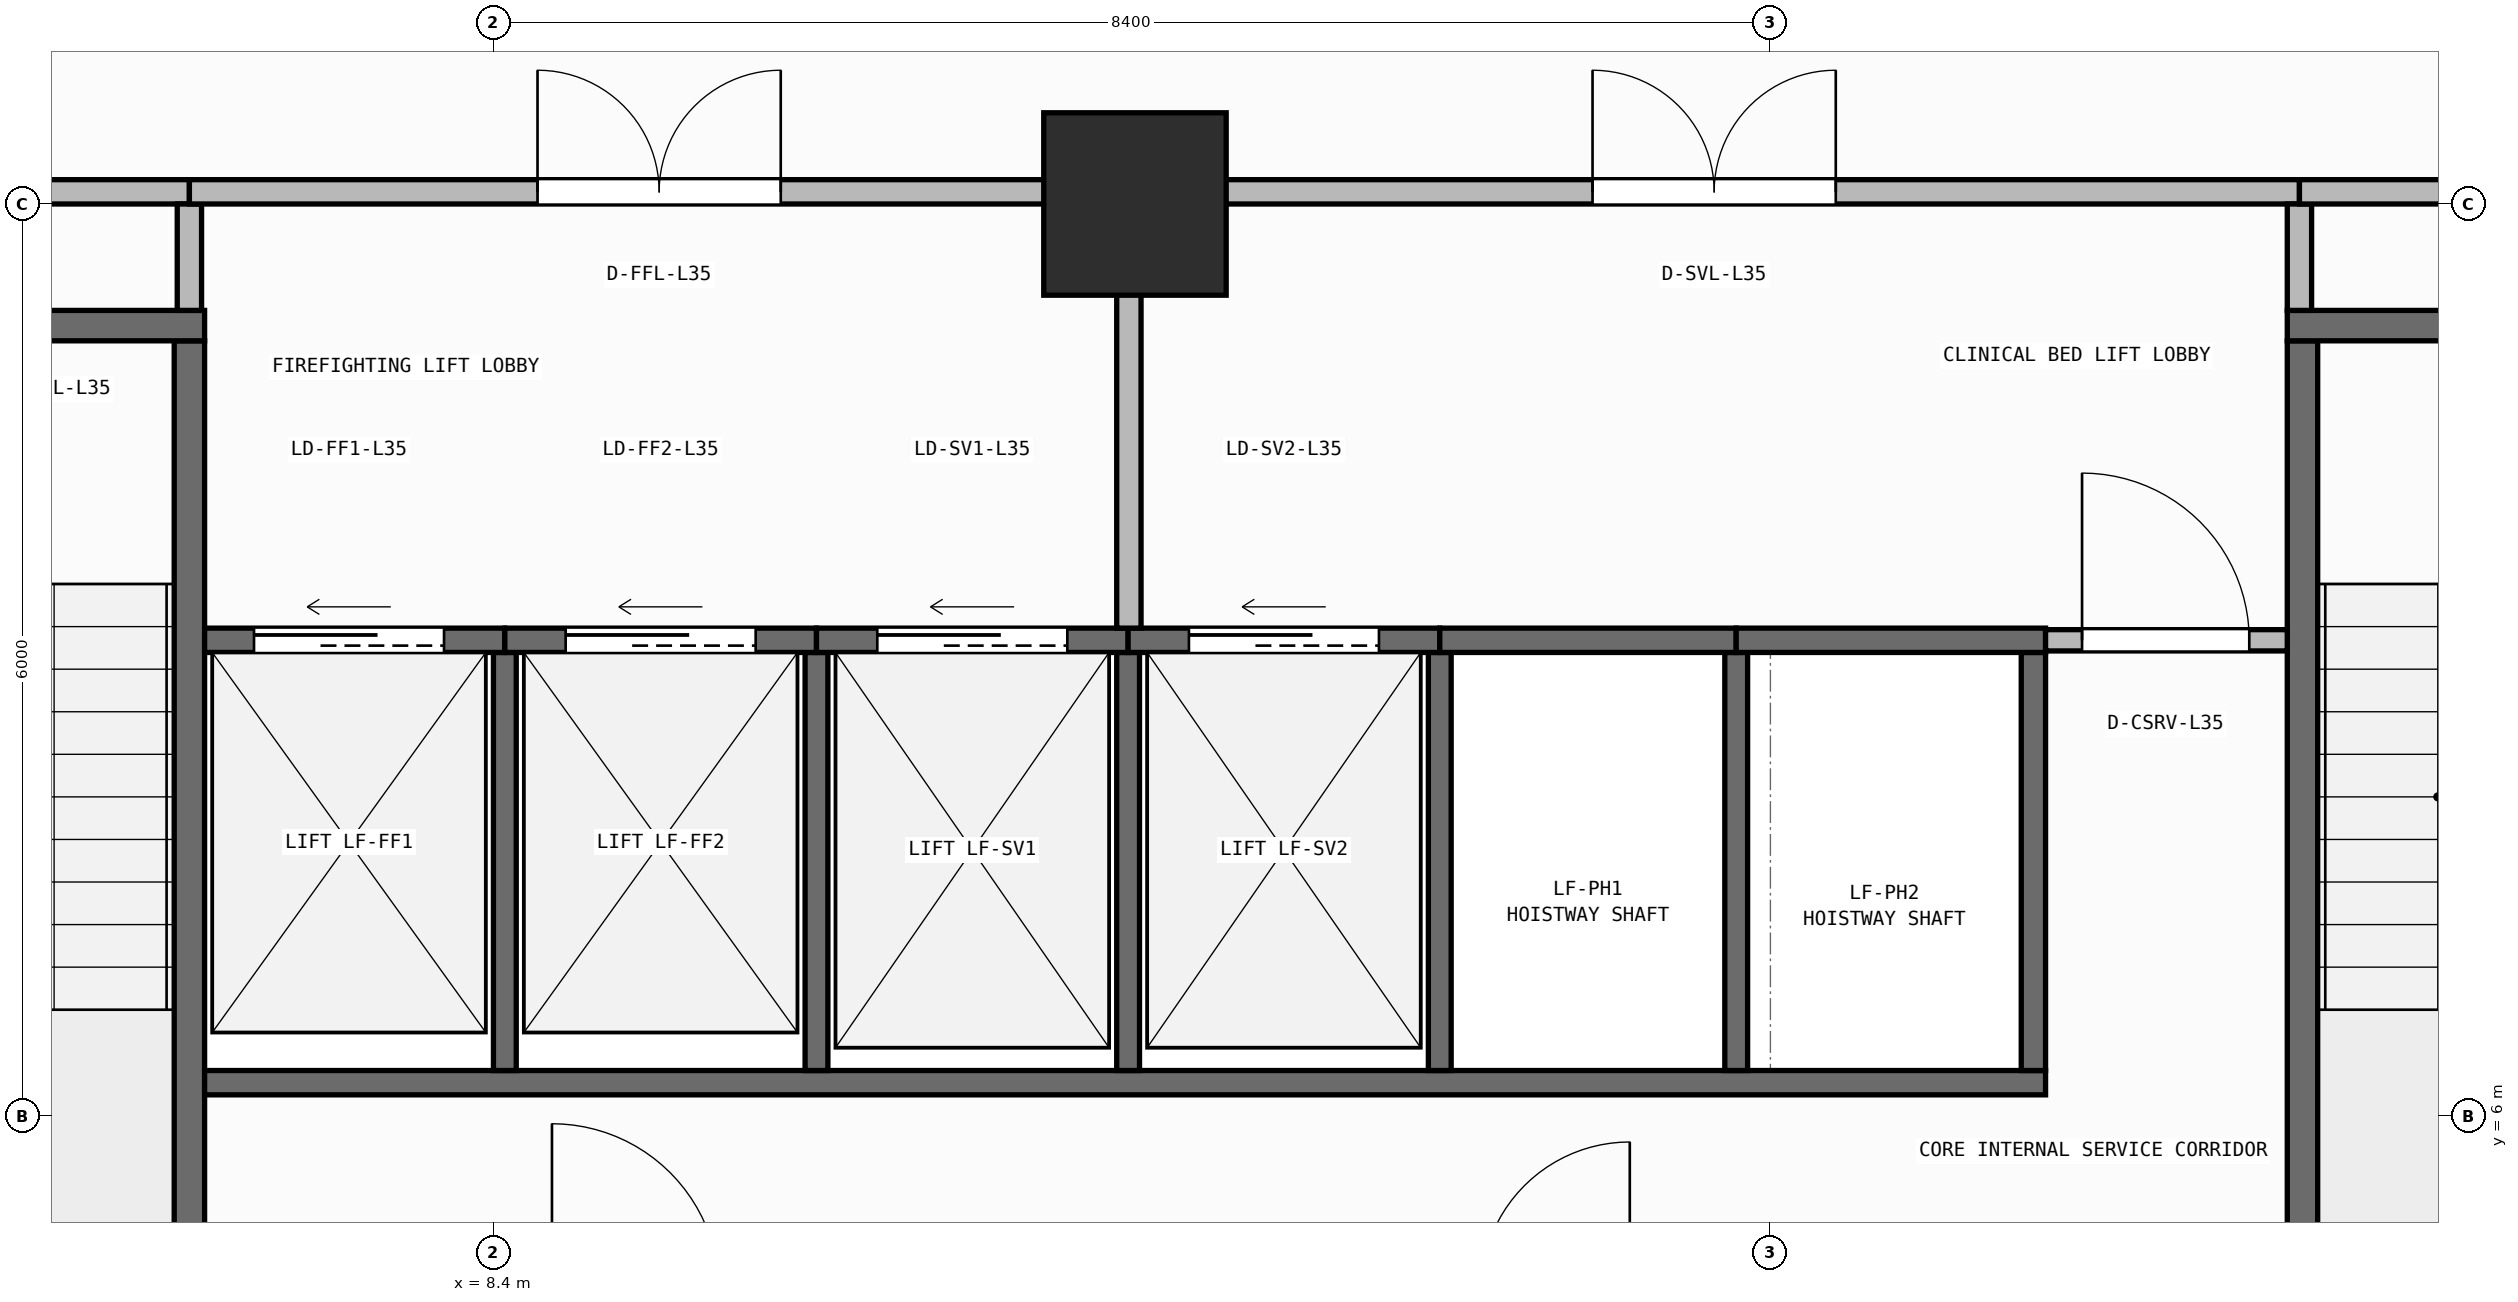
"""IFC4 building model, lengths in metres.
Left out: names, types, materials, properties, quantities, classifications, styles, units other than length and angle.
Written with IfcOpenShell. Run it as: python <this file> out.ifc"""

import sys

from ifc_helpers import new_model, si_unit, direction, frame, frame_2d, origin, origin_2d, place, context, subcontext, project, spatial, rectangle, extrude, element, fill, save


model = new_model("IFC4")
c1 = context("Model", 3, precision=1e-05, world=origin(), true_north=direction((0.0, 1.0)))
c2 = subcontext(c1, "Body", "Model", "MODEL_VIEW")
j1 = project(units=[si_unit("LENGTHUNIT", "METRE"), si_unit("PLANEANGLEUNIT", "RADIAN")], contexts=[c1])
p1 = place(None, origin())
s1 = spatial("IfcSite", under=j1, at=p1, CompositionType="ELEMENT")
p2 = place(p1, origin())
s2 = spatial("IfcBuilding", under=s1, at=p2, CompositionType="ELEMENT")
p3 = place(p2, frame((0.0, 0.0, 142.85)))
s3 = spatial("IfcBuildingStorey", under=s2, at=p3, CompositionType="ELEMENT", Elevation=142.85)
p4 = place(p3, frame((12.62, 12.0, 0.0), z_axis=(0.0, 0.0, 1.0), x_axis=(1.0, 0.0, 0.0)))
e1 = element("IfcColumn", 1, at=p4, inside=s3, PredefinedType="COLUMN", context=c2, shape_type="SweptSolid", body=[
    extrude(rectangle(XDim=1.2, YDim=1.2, at=origin_2d()), origin(), (0.0, 0.0, 1.0), 3.95),
])
p5 = place(p3, frame((6.4, 3.5, 0.0), z_axis=(0.0, 0.0, 1.0), x_axis=(0.0, 1.0, 0.0)))
e2 = element("IfcWall", 2, at=p5, inside=s3, PredefinedType="SHEAR", context=c2, shape_type="SweptSolid", body=[
    extrude(rectangle(XDim=7.6, YDim=0.2, at=frame_2d((3.8, 0.0))), origin(), (0.0, 0.0, 1.0), 3.71),
])
p6 = place(p3, frame((2.8, 11.2, 0.0), z_axis=(0.0, 0.0, 1.0), x_axis=(1.0, 0.0, 0.0)))
e3 = element("IfcWall", 3, at=p6, inside=s3, PredefinedType="SHEAR", context=c2, shape_type="SweptSolid", body=[
    extrude(rectangle(XDim=3.7, YDim=0.2, at=frame_2d((1.85, 0.0))), origin(), (0.0, 0.0, 1.0), 3.71),
])
p7 = place(p6, frame((1.2, 0.0, 0.0)))
e4 = element("IfcOpeningElement", 4, at=p7, cuts=e3, PredefinedType="OPENING", context=c2, shape_type="SweptSolid", body=[
    extrude(rectangle(XDim=1.3, YDim=2.15, at=frame_2d((0.65, 1.075))), frame((0.0, 0.11, 0.0), z_axis=(0.0, -1.0, 0.0), x_axis=(1.0, 0.0, 0.0)), (0.0, 0.0, 1.0), 0.22),
])
p8 = place(p3, frame((20.3, 3.5, 0.0), z_axis=(0.0, 0.0, 1.0), x_axis=(0.0, 1.0, 0.0)))
e5 = element("IfcWall", 5, at=p8, inside=s3, PredefinedType="SHEAR", context=c2, shape_type="SweptSolid", body=[
    extrude(rectangle(XDim=7.6, YDim=0.2, at=frame_2d((3.8, 0.0))), origin(), (0.0, 0.0, 1.0), 3.71),
])
p9 = place(p3, frame((20.2, 11.2, 0.0), z_axis=(0.0, 0.0, 1.0), x_axis=(1.0, 0.0, 0.0)))
e6 = element("IfcWall", 6, at=p9, inside=s3, PredefinedType="SHEAR", context=c2, shape_type="SweptSolid", body=[
    extrude(rectangle(XDim=3.7, YDim=0.2, at=frame_2d((1.85, 0.0))), origin(), (0.0, 0.0, 1.0), 3.71),
])
p10 = place(p9, frame((1.2, 0.0, 0.0)))
e7 = element("IfcOpeningElement", 7, at=p10, cuts=e6, PredefinedType="OPENING", context=c2, shape_type="SweptSolid", body=[
    extrude(rectangle(XDim=1.3, YDim=2.15, at=frame_2d((0.65, 1.075))), frame((0.0, 0.11, 0.0), z_axis=(0.0, -1.0, 0.0), x_axis=(1.0, 0.0, 0.0)), (0.0, 0.0, 1.0), 0.22),
])
p11 = place(p3, frame((6.5, 6.22, 0.0), z_axis=(0.0, 0.0, 1.0), x_axis=(1.0, 0.0, 0.0)))
e8 = element("IfcWall", 8, at=p11, inside=s3, PredefinedType="SHEAR", context=c2, shape_type="SweptSolid", body=[
    extrude(rectangle(XDim=12.11, YDim=0.16, at=frame_2d((6.055, 0.0))), origin(), (0.0, 0.0, 1.0), 3.71),
])
p12 = place(p3, frame((18.53, 6.3, 0.0), z_axis=(0.0, 0.0, 1.0), x_axis=(0.0, 1.0, 0.0)))
e9 = element("IfcWall", 9, at=p12, inside=s3, PredefinedType="SHEAR", context=c2, shape_type="SweptSolid", body=[
    extrude(rectangle(XDim=2.75, YDim=0.16, at=frame_2d((1.375, 0.0))), origin(), (0.0, 0.0, 1.0), 3.71),
])
for number, where, z_axis, x_axis in (
    (10, (8.475, 6.3, 0.0), (0.0, 0.0, 1.0), (0.0, 1.0, 0.0)),
    (11, (10.525, 6.3, 0.0), (0.0, 0.0, 1.0), (0.0, 1.0, 0.0)),
    (12, (12.575, 6.3, 0.0), (0.0, 0.0, 1.0), (0.0, 1.0, 0.0)),
    (13, (14.625, 6.3, 0.0), (0.0, 0.0, 1.0), (0.0, 1.0, 0.0)),
    (14, (16.575, 6.3, 0.0), (0.0, 0.0, 1.0), (0.0, 1.0, 0.0)),
):
    element("IfcWall", number, at=place(p3, frame(where, z_axis=z_axis, x_axis=x_axis)), inside=s3, PredefinedType="SHEAR", context=c2, shape_type="SweptSolid", body=[
        extrude(rectangle(XDim=2.75, YDim=0.15, at=frame_2d((1.375, 0.0))), origin(), (0.0, 0.0, 1.0), 3.71),
    ])
p13 = place(p3, frame((6.5, 9.13, 0.0), z_axis=(0.0, 0.0, 1.0), x_axis=(1.0, 0.0, 0.0)))
e15 = element("IfcWall", 15, at=p13, inside=s3, PredefinedType="SHEAR", context=c2, shape_type="SweptSolid", body=[
    extrude(rectangle(XDim=1.975, YDim=0.16, at=frame_2d((0.988, 0.0))), origin(), (0.0, 0.0, 1.0), 3.71),
])
p14 = place(p13, frame((0.325, 0.0, 0.0)))
e16 = element("IfcOpeningElement", 16, at=p14, cuts=e15, PredefinedType="OPENING", context=c2, shape_type="SweptSolid", body=[
    extrude(rectangle(XDim=1.25, YDim=2.15, at=frame_2d((0.625, 1.075))), frame((0.0, 0.09, 0.0), z_axis=(0.0, -1.0, 0.0), x_axis=(1.0, 0.0, 0.0)), (0.0, 0.0, 1.0), 0.18),
])
p15 = place(p3, frame((8.475, 9.13, 0.0), z_axis=(0.0, 0.0, 1.0), x_axis=(1.0, 0.0, 0.0)))
e17 = element("IfcWall", 17, at=p15, inside=s3, PredefinedType="SHEAR", context=c2, shape_type="SweptSolid", body=[
    extrude(rectangle(XDim=2.05, YDim=0.16, at=frame_2d((1.025, 0.0))), origin(), (0.0, 0.0, 1.0), 3.71),
])
p16 = place(p15, frame((0.4, 0.0, 0.0)))
e18 = element("IfcOpeningElement", 18, at=p16, cuts=e17, PredefinedType="OPENING", context=c2, shape_type="SweptSolid", body=[
    extrude(rectangle(XDim=1.25, YDim=2.15, at=frame_2d((0.625, 1.075))), frame((0.0, 0.09, 0.0), z_axis=(0.0, -1.0, 0.0), x_axis=(1.0, 0.0, 0.0)), (0.0, 0.0, 1.0), 0.18),
])
p17 = place(p3, frame((10.525, 9.13, 0.0), z_axis=(0.0, 0.0, 1.0), x_axis=(1.0, 0.0, 0.0)))
e19 = element("IfcWall", 19, at=p17, inside=s3, PredefinedType="SHEAR", context=c2, shape_type="SweptSolid", body=[
    extrude(rectangle(XDim=2.05, YDim=0.16, at=frame_2d((1.025, 0.0))), origin(), (0.0, 0.0, 1.0), 3.71),
])
p18 = place(p17, frame((0.4, 0.0, 0.0)))
e20 = element("IfcOpeningElement", 20, at=p18, cuts=e19, PredefinedType="OPENING", context=c2, shape_type="SweptSolid", body=[
    extrude(rectangle(XDim=1.25, YDim=2.15, at=frame_2d((0.625, 1.075))), frame((0.0, 0.09, 0.0), z_axis=(0.0, -1.0, 0.0), x_axis=(1.0, 0.0, 0.0)), (0.0, 0.0, 1.0), 0.18),
])
p19 = place(p3, frame((12.575, 9.13, 0.0), z_axis=(0.0, 0.0, 1.0), x_axis=(1.0, 0.0, 0.0)))
e21 = element("IfcWall", 21, at=p19, inside=s3, PredefinedType="SHEAR", context=c2, shape_type="SweptSolid", body=[
    extrude(rectangle(XDim=2.05, YDim=0.16, at=frame_2d((1.025, 0.0))), origin(), (0.0, 0.0, 1.0), 3.71),
])
p20 = place(p19, frame((0.4, 0.0, 0.0)))
e22 = element("IfcOpeningElement", 22, at=p20, cuts=e21, PredefinedType="OPENING", context=c2, shape_type="SweptSolid", body=[
    extrude(rectangle(XDim=1.25, YDim=2.15, at=frame_2d((0.625, 1.075))), frame((0.0, 0.09, 0.0), z_axis=(0.0, -1.0, 0.0), x_axis=(1.0, 0.0, 0.0)), (0.0, 0.0, 1.0), 0.18),
])
p21 = place(p3, frame((14.625, 9.13, 0.0), z_axis=(0.0, 0.0, 1.0), x_axis=(1.0, 0.0, 0.0)))
e23 = element("IfcWall", 23, at=p21, inside=s3, PredefinedType="SHEAR", context=c2, shape_type="SweptSolid", body=[
    extrude(rectangle(XDim=1.95, YDim=0.16, at=frame_2d((0.975, 0.0))), origin(), (0.0, 0.0, 1.0), 3.71),
])
p22 = place(p3, frame((16.575, 9.13, 0.0), z_axis=(0.0, 0.0, 1.0), x_axis=(1.0, 0.0, 0.0)))
e24 = element("IfcWall", 24, at=p22, inside=s3, PredefinedType="SHEAR", context=c2, shape_type="SweptSolid", body=[
    extrude(rectangle(XDim=2.035, YDim=0.16, at=frame_2d((1.018, 0.0))), origin(), (0.0, 0.0, 1.0), 3.71),
])
p23 = place(p3, frame((18.61, 9.13, 0.0), z_axis=(0.0, 0.0, 1.0), x_axis=(1.0, 0.0, 0.0)))
e25 = element("IfcWall", 25, at=p23, inside=s3, PredefinedType="PARTITIONING", context=c2, shape_type="SweptSolid", body=[
    extrude(rectangle(XDim=1.59, YDim=0.14, at=frame_2d((0.795, 0.0))), origin(), (0.0, 0.0, 1.0), 3.71),
])
p24 = place(p23, frame((0.24, 0.0, 0.0)))
e26 = element("IfcOpeningElement", 26, at=p24, cuts=e25, PredefinedType="OPENING", context=c2, shape_type="SweptSolid", body=[
    extrude(rectangle(XDim=1.1, YDim=2.1, at=frame_2d((0.55, 1.05))), frame((0.0, 0.08, 0.0), z_axis=(0.0, -1.0, 0.0), x_axis=(1.0, 0.0, 0.0)), (0.0, 0.0, 1.0), 0.16),
])
p25 = place(p3, frame((2.8, 12.08, 0.0), z_axis=(0.0, 0.0, 1.0), x_axis=(1.0, 0.0, 0.0)))
e27 = element("IfcWall", 27, at=p25, inside=s3, PredefinedType="PARTITIONING", context=c2, shape_type="SweptSolid", body=[
    extrude(rectangle(XDim=3.6, YDim=0.16, at=frame_2d((1.8, 0.0))), origin(), (0.0, 0.0, 1.0), 3.083),
])
p26 = place(p25, frame((1.0, 0.0, 0.0)))
e28 = element("IfcOpeningElement", 28, at=p26, cuts=e27, PredefinedType="OPENING", context=c2, shape_type="SweptSolid", body=[
    extrude(rectangle(XDim=1.6, YDim=2.05, at=frame_2d((0.8, 1.025))), frame((0.0, 0.09, 0.0), z_axis=(0.0, -1.0, 0.0), x_axis=(1.0, 0.0, 0.0)), (0.0, 0.0, 1.0), 0.18),
])
p27 = place(p3, frame((6.4, 11.3, 0.0), z_axis=(0.0, 0.0, 1.0), x_axis=(0.0, 1.0, 0.0)))
e29 = element("IfcWall", 29, at=p27, inside=s3, PredefinedType="PARTITIONING", context=c2, shape_type="SweptSolid", body=[
    extrude(rectangle(XDim=0.7, YDim=0.16, at=frame_2d((0.35, 0.0))), origin(), (0.0, 0.0, 1.0), 3.71),
])
p28 = place(p3, frame((6.4, 12.08, 0.0), z_axis=(0.0, 0.0, 1.0), x_axis=(1.0, 0.0, 0.0)))
e30 = element("IfcWall", 30, at=p28, inside=s3, PredefinedType="PARTITIONING", context=c2, shape_type="SweptSolid", body=[
    extrude(rectangle(XDim=6.18, YDim=0.16, at=frame_2d((3.09, 0.0))), origin(), (0.0, 0.0, 1.0), 3.083),
])
p29 = place(p28, frame((2.29, 0.0, 0.0)))
e31 = element("IfcOpeningElement", 31, at=p29, cuts=e30, PredefinedType="OPENING", context=c2, shape_type="SweptSolid", body=[
    extrude(rectangle(XDim=1.6, YDim=2.05, at=frame_2d((0.8, 1.025))), frame((0.0, 0.09, 0.0), z_axis=(0.0, -1.0, 0.0), x_axis=(1.0, 0.0, 0.0)), (0.0, 0.0, 1.0), 0.18),
])
p30 = place(p3, frame((12.58, 9.21, 0.0), z_axis=(0.0, 0.0, 1.0), x_axis=(0.0, 1.0, 0.0)))
e32 = element("IfcWall", 32, at=p30, inside=s3, PredefinedType="PARTITIONING", context=c2, shape_type="SweptSolid", body=[
    extrude(rectangle(XDim=2.79, YDim=0.16, at=frame_2d((1.395, 0.0))), origin(), (0.0, 0.0, 1.0), 3.71),
])
p31 = place(p3, frame((12.58, 12.08, 0.0), z_axis=(0.0, 0.0, 1.0), x_axis=(1.0, 0.0, 0.0)))
e33 = element("IfcWall", 33, at=p31, inside=s3, PredefinedType="PARTITIONING", context=c2, shape_type="SweptSolid", body=[
    extrude(rectangle(XDim=7.7, YDim=0.16, at=frame_2d((3.85, 0.0))), origin(), (0.0, 0.0, 1.0), 3.083),
])
p32 = place(p31, frame((3.05, 0.0, 0.0)))
e34 = element("IfcOpeningElement", 34, at=p32, cuts=e33, PredefinedType="OPENING", context=c2, shape_type="SweptSolid", body=[
    extrude(rectangle(XDim=1.6, YDim=2.05, at=frame_2d((0.8, 1.025))), frame((0.0, 0.09, 0.0), z_axis=(0.0, -1.0, 0.0), x_axis=(1.0, 0.0, 0.0)), (0.0, 0.0, 1.0), 0.18),
])
p33 = place(p3, frame((20.28, 11.3, 0.0), z_axis=(0.0, 0.0, 1.0), x_axis=(0.0, 1.0, 0.0)))
e35 = element("IfcWall", 35, at=p33, inside=s3, PredefinedType="PARTITIONING", context=c2, shape_type="SweptSolid", body=[
    extrude(rectangle(XDim=0.7, YDim=0.16, at=frame_2d((0.35, 0.0))), origin(), (0.0, 0.0, 1.0), 3.71),
])
p34 = place(p3, frame((20.28, 12.08, 0.0), z_axis=(0.0, 0.0, 1.0), x_axis=(1.0, 0.0, 0.0)))
e36 = element("IfcWall", 36, at=p34, inside=s3, PredefinedType="PARTITIONING", context=c2, shape_type="SweptSolid", body=[
    extrude(rectangle(XDim=3.62, YDim=0.16, at=frame_2d((1.81, 0.0))), origin(), (0.0, 0.0, 1.0), 3.083),
])
p35 = place(p34, frame((1.01, 0.0, 0.0)))
e37 = element("IfcOpeningElement", 37, at=p35, cuts=e36, PredefinedType="OPENING", context=c2, shape_type="SweptSolid", body=[
    extrude(rectangle(XDim=1.6, YDim=2.05, at=frame_2d((0.8, 1.025))), frame((0.0, 0.09, 0.0), z_axis=(0.0, -1.0, 0.0), x_axis=(1.0, 0.0, 0.0)), (0.0, 0.0, 1.0), 0.18),
])
p36 = place(p14, origin())
e38 = element("IfcDoor", 38, at=p36, inside=s3, OperationType="SLIDING_TO_LEFT", PredefinedType="DOOR", context=c2, shape_type="SweptSolid", body=[
    extrude(rectangle(XDim=1.25, YDim=2.15, at=frame_2d((0.625, 1.075))), frame((0.0, 0.025, 0.0), z_axis=(0.0, -1.0, 0.0), x_axis=(1.0, 0.0, 0.0)), (0.0, 0.0, 1.0), 0.05),
])
fill(e16, e38)
p37 = place(p16, origin())
e39 = element("IfcDoor", 39, at=p37, inside=s3, OperationType="SLIDING_TO_LEFT", PredefinedType="DOOR", context=c2, shape_type="SweptSolid", body=[
    extrude(rectangle(XDim=1.25, YDim=2.15, at=frame_2d((0.625, 1.075))), frame((0.0, 0.025, 0.0), z_axis=(0.0, -1.0, 0.0), x_axis=(1.0, 0.0, 0.0)), (0.0, 0.0, 1.0), 0.05),
])
fill(e18, e39)
p38 = place(p18, origin())
e40 = element("IfcDoor", 40, at=p38, inside=s3, OperationType="SLIDING_TO_LEFT", PredefinedType="DOOR", context=c2, shape_type="SweptSolid", body=[
    extrude(rectangle(XDim=1.25, YDim=2.15, at=frame_2d((0.625, 1.075))), frame((0.0, 0.025, 0.0), z_axis=(0.0, -1.0, 0.0), x_axis=(1.0, 0.0, 0.0)), (0.0, 0.0, 1.0), 0.05),
])
fill(e20, e40)
p39 = place(p20, origin())
e41 = element("IfcDoor", 41, at=p39, inside=s3, OperationType="SLIDING_TO_LEFT", PredefinedType="DOOR", context=c2, shape_type="SweptSolid", body=[
    extrude(rectangle(XDim=1.25, YDim=2.15, at=frame_2d((0.625, 1.075))), frame((0.0, 0.025, 0.0), z_axis=(0.0, -1.0, 0.0), x_axis=(1.0, 0.0, 0.0)), (0.0, 0.0, 1.0), 0.05),
])
fill(e22, e41)
p40 = place(p24, origin())
e42 = element("IfcDoor", 42, at=p40, inside=s3, OperationType="SINGLE_SWING_LEFT", PredefinedType="DOOR", context=c2, shape_type="SweptSolid", body=[
    extrude(rectangle(XDim=1.1, YDim=2.1, at=frame_2d((0.55, 1.05))), frame((0.0, 0.025, 0.0), z_axis=(0.0, -1.0, 0.0), x_axis=(1.0, 0.0, 0.0)), (0.0, 0.0, 1.0), 0.05),
])
fill(e26, e42)
p41 = place(p29, origin())
e43 = element("IfcDoor", 43, at=p41, inside=s3, OperationType="DOUBLE_DOOR_SINGLE_SWING", PredefinedType="DOOR", context=c2, shape_type="SweptSolid", body=[
    extrude(rectangle(XDim=1.6, YDim=2.05, at=frame_2d((0.8, 1.025))), frame((0.0, 0.025, 0.0), z_axis=(0.0, -1.0, 0.0), x_axis=(1.0, 0.0, 0.0)), (0.0, 0.0, 1.0), 0.05),
])
fill(e31, e43)
p42 = place(p32, origin())
e44 = element("IfcDoor", 44, at=p42, inside=s3, OperationType="DOUBLE_DOOR_SINGLE_SWING", PredefinedType="DOOR", context=c2, shape_type="SweptSolid", body=[
    extrude(rectangle(XDim=1.6, YDim=2.05, at=frame_2d((0.8, 1.025))), frame((0.0, 0.025, 0.0), z_axis=(0.0, -1.0, 0.0), x_axis=(1.0, 0.0, 0.0)), (0.0, 0.0, 1.0), 0.05),
])
fill(e34, e44)
save(model, sys.argv[1])
